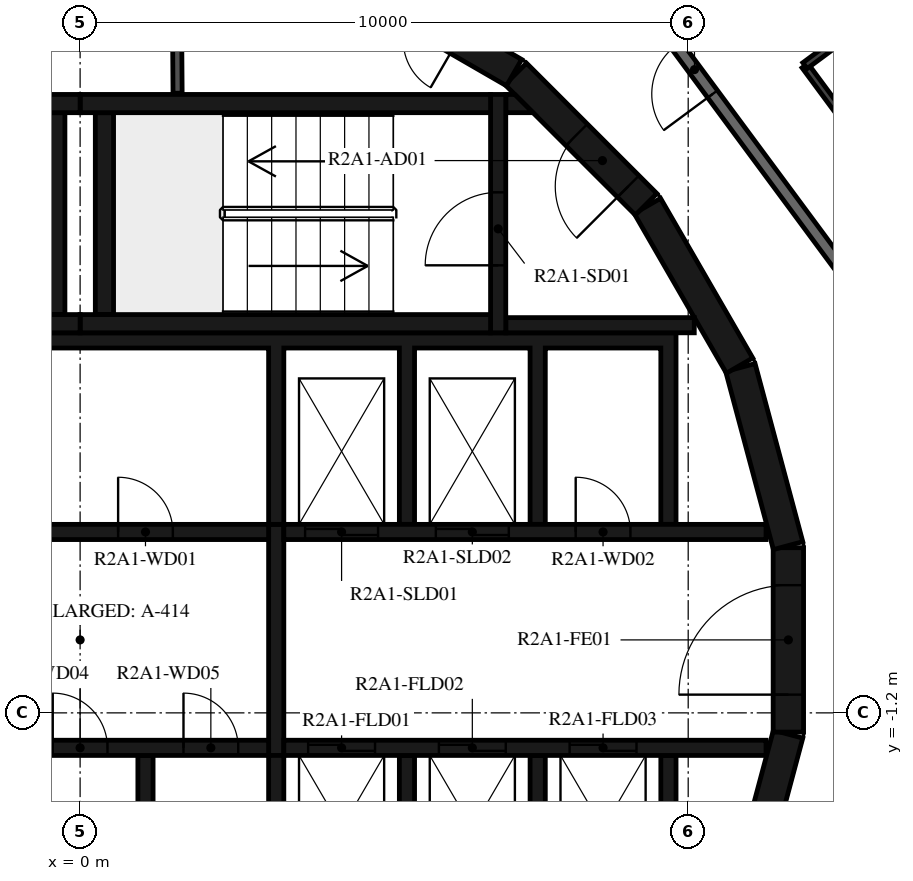
"""IFC4 building model, lengths in metres.
Left out: names, types, materials, properties, quantities, classifications, styles, units other than length and angle.
Written with IfcOpenShell. Run it as: python <this file> out.ifc"""

import sys

from ifc_helpers import new_model, si_unit, direction, frame, frame_2d, origin, place, context, subcontext, project, spatial, polyline, rectangle, outline, extrude, element, fill, save


model = new_model("IFC4")
c1 = context("Model", 3, precision=1e-05, world=origin(), true_north=direction((0.0, 1.0)))
c2 = subcontext(c1, "Body", "Model", "MODEL_VIEW")
j1 = project(units=[si_unit("LENGTHUNIT", "METRE"), si_unit("PLANEANGLEUNIT", "RADIAN")], contexts=[c1])
p1 = place(None, origin())
s1 = spatial("IfcSite", under=j1, at=p1, CompositionType="ELEMENT")
p2 = place(p1, origin())
s2 = spatial("IfcBuilding", under=s1, at=p2, CompositionType="ELEMENT")
p3 = place(p2, frame((0.0, 0.0, 80.2)))
s3 = spatial("IfcBuildingStorey", under=s2, at=p3, CompositionType="ELEMENT", Elevation=80.2)
p4 = place(p3, frame((10.858, -4.479, 0.0), z_axis=(0.0, 0.0, 1.0), x_axis=(0.258734743916, 0.965948410781, 0.0)))
e1 = element("IfcWall", 1, at=p4, inside=s3, PredefinedType="SHEAR", context=c2, shape_type="SweptSolid", body=[
    extrude(rectangle(XDim=3.033, YDim=0.5, at=frame_2d((1.516, 0.0))), origin(), (0.0, 0.0, 1.0), 3.12),
])
p5 = place(p3, frame((11.647, -1.516, 0.0), z_axis=(0.0, 0.0, 1.0), x_axis=(0.0, 1.0, 0.0)))
e2 = element("IfcWall", 2, at=p5, inside=s3, PredefinedType="SHEAR", context=c2, shape_type="SweptSolid", body=[
    extrude(rectangle(XDim=3.033, YDim=0.5, at=frame_2d((1.516, 0.0))), origin(), (0.0, 0.0, 1.0), 3.12),
])
p6 = place(p5, frame((0.616, 0.0, 0.0)))
e3 = element("IfcOpeningElement", 3, at=p6, cuts=e2, PredefinedType="OPENING", context=c2, shape_type="SweptSolid", body=[
    extrude(rectangle(XDim=1.8, YDim=2.1, at=frame_2d((0.9, 1.05))), frame((0.0, 0.26, 0.0), z_axis=(0.0, -1.0, 0.0), x_axis=(1.0, 0.0, 0.0)), (0.0, 0.0, 1.0), 0.52),
])
for number, where, z_axis, x_axis in (
    (4, (11.643, 1.55, 0.0), (0.0, 0.0, 1.0), (-0.259, 0.966, 0.0)),
    (5, (10.845, 4.51, 0.0), (0.0, 0.0, 1.0), (-0.5, 0.866, 0.0)),
):
    element("IfcWall", number, at=place(p3, frame(where, z_axis=z_axis, x_axis=x_axis)), inside=s3, PredefinedType="SHEAR", context=c2, shape_type="SweptSolid", body=[
        extrude(rectangle(XDim=3.033, YDim=0.5, at=frame_2d((1.516, 0.0))), origin(), (0.0, 0.0, 1.0), 3.12),
    ])
p7 = place(p3, frame((9.308, 7.164, 0.0), z_axis=(0.0, 0.0, 1.0), x_axis=(-0.707106781187, 0.707106781187, 0.0)))
e6 = element("IfcWall", 6, at=p7, inside=s3, PredefinedType="SHEAR", context=c2, shape_type="SweptSolid", body=[
    extrude(rectangle(XDim=3.032, YDim=0.5, at=frame_2d((1.516, 0.0))), origin(), (0.0, 0.0, 1.0), 3.12),
])
p8 = place(p7, frame((0.416, 0.0, 0.0)))
e7 = element("IfcOpeningElement", 7, at=p8, cuts=e6, PredefinedType="OPENING", context=c2, shape_type="SweptSolid", body=[
    extrude(rectangle(XDim=1.2, YDim=2.1, at=frame_2d((0.6, 1.05))), frame((0.0, 0.26, 0.0), z_axis=(0.0, -1.0, 0.0), x_axis=(1.0, 0.0, 0.0)), (0.0, 0.0, 1.0), 0.52),
])
p9 = place(p3, frame((7.137, 9.329, 0.0), z_axis=(0.0, 0.0, 1.0), x_axis=(-0.865975092491, 0.500087131594, 0.0)))
e8 = element("IfcWall", 8, at=p9, inside=s3, PredefinedType="SHEAR", context=c2, shape_type="SweptSolid", body=[
    extrude(rectangle(XDim=3.033, YDim=0.5, at=frame_2d((1.516, 0.0))), origin(), (0.0, 0.0, 1.0), 3.12),
])
p10 = place(p9, frame((1.066, 0.0, 0.0)))
e9 = element("IfcOpeningElement", 9, at=p10, cuts=e8, PredefinedType="OPENING", context=c2, shape_type="SweptSolid", body=[
    extrude(rectangle(XDim=0.9, YDim=2.1, at=frame_2d((0.45, 1.05))), frame((0.0, 0.26, 0.0), z_axis=(0.0, -1.0, 0.0), x_axis=(1.0, 0.0, 0.0)), (0.0, 0.0, 1.0), 0.52),
])
for number, where, z_axis, x_axis in (
    (10, (0.0, 5.2, 0.0), (0.0, 0.0, 1.0), (1.0, 0.0, 0.0)),
    (11, (0.0, 8.82, 0.0), (0.0, 0.0, 1.0), (1.0, 0.0, 0.0)),
):
    element("IfcWall", number, at=place(p3, frame(where, z_axis=z_axis, x_axis=x_axis)), inside=s3, PredefinedType="SHEAR", context=c2, shape_type="SweptSolid", body=[
        extrude(rectangle(XDim=6.75, YDim=0.3, at=frame_2d((3.375, 0.0))), origin(), (0.0, 0.0, 1.0), 3.12),
    ])
p11 = place(p3, frame((0.4, 5.35, 0.0), z_axis=(0.0, 0.0, 1.0), x_axis=(0.0, 1.0, 0.0)))
e12 = element("IfcWall", 12, at=p11, inside=s3, PredefinedType="SHEAR", context=c2, shape_type="SweptSolid", body=[
    extrude(rectangle(XDim=3.32, YDim=0.3, at=frame_2d((1.66, 0.0))), origin(), (0.0, 0.0, 1.0), 3.12),
])
p12 = place(p3, frame((6.875, 5.05, 0.0), z_axis=(0.0, 0.0, 1.0), x_axis=(0.0, 1.0, 0.0)))
e13 = element("IfcWall", 13, at=p12, inside=s3, PredefinedType="SHEAR", context=c2, shape_type="SweptSolid", body=[
    extrude(rectangle(XDim=3.92, YDim=0.25, at=frame_2d((1.96, 0.0))), origin(), (0.0, 0.0, 1.0), 3.12),
])
p13 = place(p12, frame((1.11, 0.0, 0.0)))
e14 = element("IfcOpeningElement", 14, at=p13, cuts=e13, PredefinedType="OPENING", context=c2, shape_type="SweptSolid", body=[
    extrude(rectangle(XDim=1.2, YDim=2.1, at=frame_2d((0.6, 1.05))), frame((0.0, 0.135, 0.0), z_axis=(0.0, -1.0, 0.0), x_axis=(1.0, 0.0, 0.0)), (0.0, 0.0, 1.0), 0.27),
])
p14 = place(p3, frame((7.0, 5.175, 0.0), z_axis=(0.0, 0.0, 1.0), x_axis=(1.0, 0.0, 0.0)))
e15 = element("IfcWall", 15, at=p14, inside=s3, PredefinedType="SHEAR", context=c2, shape_type="SweptSolid", body=[
    extrude(rectangle(XDim=3.1, YDim=0.25, at=frame_2d((1.55, 0.0))), origin(), (0.0, 0.0, 1.0), 3.12),
])
p15 = place(p3, origin())
e16 = element("IfcWall", 16, at=p15, inside=s3, PredefinedType="SHEAR", context=c2, shape_type="SweptSolid", body=[
    extrude(outline(polyline([(7.448, 8.67), (7.0, 8.67), (7.0, 8.97), (7.148, 8.97), (7.448, 8.67)])), origin(), (0.0, 0.0, 1.0), 3.12),
])
for number, where, z_axis, x_axis in (
    (17, (-6.75, 5.2, 0.0), (0.0, 0.0, 1.0), (1.0, 0.0, 0.0)),
    (18, (-6.75, 8.82, 0.0), (0.0, 0.0, 1.0), (1.0, 0.0, 0.0)),
):
    element("IfcWall", number, at=place(p3, frame(where, z_axis=z_axis, x_axis=x_axis)), inside=s3, PredefinedType="SHEAR", context=c2, shape_type="SweptSolid", body=[
        extrude(rectangle(XDim=6.75, YDim=0.3, at=frame_2d((3.375, 0.0))), origin(), (0.0, 0.0, 1.0), 3.12),
    ])
p16 = place(p3, frame((-0.4, 5.35, 0.0), z_axis=(0.0, 0.0, 1.0), x_axis=(0.0, 1.0, 0.0)))
e19 = element("IfcWall", 19, at=p16, inside=s3, PredefinedType="SHEAR", context=c2, shape_type="SweptSolid", body=[
    extrude(rectangle(XDim=3.32, YDim=0.3, at=frame_2d((1.66, 0.0))), origin(), (0.0, 0.0, 1.0), 3.12),
])
p17 = place(p3, origin())
e20 = element("IfcWall", 20, at=p17, inside=s3, PredefinedType="SHEAR", context=c2, shape_type="SweptSolid", body=[
    extrude(outline(polyline([(-9.55, 4.8), (-7.65, 4.8), (-7.65, 1.9), (-7.4, 1.9), (-7.4, 4.8), (-5.5, 4.8), (-5.5, 1.9), (-5.25, 1.9), (-5.25, 4.8), (-3.35, 4.8), (-3.35, 1.9), (-3.1, 1.9), (-3.1, 4.8), (-1.2, 4.8), (-1.2, 1.9), (-0.95, 1.9), (-0.95, 4.8), (3.1, 4.8), (3.1, 1.9), (3.35, 1.9), (3.35, 4.8), (5.25, 4.8), (5.25, 1.9), (5.5, 1.9), (5.5, 4.8), (7.4, 4.8), (7.4, 1.9), (7.65, 1.9), (7.65, 4.8), (9.55, 4.8), (9.55, 1.9), (9.8, 1.9), (9.8, 4.8), (9.8, 5.05), (-9.8, 5.05), (-9.8, 4.8), (-9.8, 1.9), (-9.55, 1.9), (-9.55, 4.8)])), origin(), (0.0, 0.0, 1.0), 3.12),
])
p18 = place(p3, origin())
e21 = element("IfcWall", 21, at=p18, inside=s3, PredefinedType="SHEAR", context=c2, shape_type="SweptSolid", body=[
    extrude(outline(polyline([(9.8, -5.05), (9.8, -4.8), (9.8, -1.9), (9.55, -1.9), (9.55, -4.8), (7.65, -4.8), (7.65, -1.9), (7.4, -1.9), (7.4, -4.8), (5.5, -4.8), (5.5, -1.9), (5.25, -1.9), (5.25, -4.8), (3.35, -4.8), (3.35, -1.9), (3.1, -1.9), (3.1, -4.8), (1.2, -4.8), (1.2, -1.9), (0.95, -1.9), (0.95, -4.8), (-0.95, -4.8), (-0.95, -1.9), (-1.2, -1.9), (-1.2, -4.8), (-5.25, -4.8), (-5.25, -1.9), (-5.5, -1.9), (-5.5, -4.8), (-7.4, -4.8), (-7.4, -1.9), (-7.65, -1.9), (-7.65, -4.8), (-9.55, -4.8), (-9.55, -1.9), (-9.8, -1.9), (-9.8, -4.8), (-9.8, -5.05), (9.8, -5.05)])), origin(), (0.0, 0.0, 1.0), 3.12),
])
p19 = place(p3, frame((-11.28, 1.775, 0.0), z_axis=(0.0, 0.0, 1.0), x_axis=(1.0, 0.0, 0.0)))
e22 = element("IfcWall", 22, at=p19, inside=s3, PredefinedType="SHEAR", context=c2, shape_type="SweptSolid", body=[
    extrude(rectangle(XDim=14.38, YDim=0.25, at=frame_2d((7.19, 0.0))), origin(), (0.0, 0.0, 1.0), 3.12),
])
p20 = place(p19, frame((2.13, 0.0, 0.0)))
e23 = element("IfcOpeningElement", 23, at=p20, cuts=e22, PredefinedType="OPENING", context=c2, shape_type="SweptSolid", body=[
    extrude(rectangle(XDim=1.1, YDim=2.1, at=frame_2d((0.55, 1.05))), frame((0.0, 0.135, 0.0), z_axis=(0.0, -1.0, 0.0), x_axis=(1.0, 0.0, 0.0)), (0.0, 0.0, 1.0), 0.27),
])
p21 = place(p19, frame((4.28, 0.0, 0.0)))
e24 = element("IfcOpeningElement", 24, at=p21, cuts=e22, PredefinedType="OPENING", context=c2, shape_type="SweptSolid", body=[
    extrude(rectangle(XDim=1.1, YDim=2.1, at=frame_2d((0.55, 1.05))), frame((0.0, 0.135, 0.0), z_axis=(0.0, -1.0, 0.0), x_axis=(1.0, 0.0, 0.0)), (0.0, 0.0, 1.0), 0.27),
])
p22 = place(p19, frame((6.43, 0.0, 0.0)))
e25 = element("IfcOpeningElement", 25, at=p22, cuts=e22, PredefinedType="OPENING", context=c2, shape_type="SweptSolid", body=[
    extrude(rectangle(XDim=1.1, YDim=2.1, at=frame_2d((0.55, 1.05))), frame((0.0, 0.135, 0.0), z_axis=(0.0, -1.0, 0.0), x_axis=(1.0, 0.0, 0.0)), (0.0, 0.0, 1.0), 0.27),
])
p23 = place(p19, frame((8.58, 0.0, 0.0)))
e26 = element("IfcOpeningElement", 26, at=p23, cuts=e22, PredefinedType="OPENING", context=c2, shape_type="SweptSolid", body=[
    extrude(rectangle(XDim=1.1, YDim=2.1, at=frame_2d((0.55, 1.05))), frame((0.0, 0.135, 0.0), z_axis=(0.0, -1.0, 0.0), x_axis=(1.0, 0.0, 0.0)), (0.0, 0.0, 1.0), 0.27),
])
p24 = place(p19, frame((11.905, 0.0, 0.0)))
e27 = element("IfcOpeningElement", 27, at=p24, cuts=e22, PredefinedType="OPENING", context=c2, shape_type="SweptSolid", body=[
    extrude(rectangle(XDim=0.9, YDim=2.1, at=frame_2d((0.45, 1.05))), frame((0.0, 0.135, 0.0), z_axis=(0.0, -1.0, 0.0), x_axis=(1.0, 0.0, 0.0)), (0.0, 0.0, 1.0), 0.27),
])
p25 = place(p3, frame((3.35, 1.775, 0.0), z_axis=(0.0, 0.0, 1.0), x_axis=(1.0, 0.0, 0.0)))
e28 = element("IfcWall", 28, at=p25, inside=s3, PredefinedType="SHEAR", context=c2, shape_type="SweptSolid", body=[
    extrude(rectangle(XDim=7.93, YDim=0.25, at=frame_2d((3.965, 0.0))), origin(), (0.0, 0.0, 1.0), 3.12),
])
p26 = place(p25, frame((0.35, 0.0, 0.0)))
e29 = element("IfcOpeningElement", 29, at=p26, cuts=e28, PredefinedType="OPENING", context=c2, shape_type="SweptSolid", body=[
    extrude(rectangle(XDim=1.2, YDim=2.4, at=frame_2d((0.6, 1.2))), frame((0.0, 0.135, 0.0), z_axis=(0.0, -1.0, 0.0), x_axis=(1.0, 0.0, 0.0)), (0.0, 0.0, 1.0), 0.27),
])
p27 = place(p25, frame((2.5, 0.0, 0.0)))
e30 = element("IfcOpeningElement", 30, at=p27, cuts=e28, PredefinedType="OPENING", context=c2, shape_type="SweptSolid", body=[
    extrude(rectangle(XDim=1.2, YDim=2.4, at=frame_2d((0.6, 1.2))), frame((0.0, 0.135, 0.0), z_axis=(0.0, -1.0, 0.0), x_axis=(1.0, 0.0, 0.0)), (0.0, 0.0, 1.0), 0.27),
])
p28 = place(p25, frame((4.8, 0.0, 0.0)))
e31 = element("IfcOpeningElement", 31, at=p28, cuts=e28, PredefinedType="OPENING", context=c2, shape_type="SweptSolid", body=[
    extrude(rectangle(XDim=0.9, YDim=2.1, at=frame_2d((0.45, 1.05))), frame((0.0, 0.135, 0.0), z_axis=(0.0, -1.0, 0.0), x_axis=(1.0, 0.0, 0.0)), (0.0, 0.0, 1.0), 0.27),
])
p29 = place(p3, frame((-11.28, -1.775, 0.0), z_axis=(0.0, 0.0, 1.0), x_axis=(1.0, 0.0, 0.0)))
e32 = element("IfcWall", 32, at=p29, inside=s3, PredefinedType="SHEAR", context=c2, shape_type="SweptSolid", body=[
    extrude(rectangle(XDim=14.38, YDim=0.25, at=frame_2d((7.19, 0.0))), origin(), (0.0, 0.0, 1.0), 3.12),
])
p30 = place(p29, frame((7.605, 0.0, 0.0)))
e33 = element("IfcOpeningElement", 33, at=p30, cuts=e32, PredefinedType="OPENING", context=c2, shape_type="SweptSolid", body=[
    extrude(rectangle(XDim=0.9, YDim=2.1, at=frame_2d((0.45, 1.05))), frame((0.0, 0.135, 0.0), z_axis=(0.0, -1.0, 0.0), x_axis=(1.0, 0.0, 0.0)), (0.0, 0.0, 1.0), 0.27),
])
p31 = place(p29, frame((10.83, 0.0, 0.0)))
e34 = element("IfcOpeningElement", 34, at=p31, cuts=e32, PredefinedType="OPENING", context=c2, shape_type="SweptSolid", body=[
    extrude(rectangle(XDim=0.9, YDim=2.1, at=frame_2d((0.45, 1.05))), frame((0.0, 0.135, 0.0), z_axis=(0.0, -1.0, 0.0), x_axis=(1.0, 0.0, 0.0)), (0.0, 0.0, 1.0), 0.27),
])
p32 = place(p29, frame((12.98, 0.0, 0.0)))
e35 = element("IfcOpeningElement", 35, at=p32, cuts=e32, PredefinedType="OPENING", context=c2, shape_type="SweptSolid", body=[
    extrude(rectangle(XDim=0.9, YDim=2.1, at=frame_2d((0.45, 1.05))), frame((0.0, 0.135, 0.0), z_axis=(0.0, -1.0, 0.0), x_axis=(1.0, 0.0, 0.0)), (0.0, 0.0, 1.0), 0.27),
])
p33 = place(p3, frame((3.35, -1.775, 0.0), z_axis=(0.0, 0.0, 1.0), x_axis=(1.0, 0.0, 0.0)))
e36 = element("IfcWall", 36, at=p33, inside=s3, PredefinedType="SHEAR", context=c2, shape_type="SweptSolid", body=[
    extrude(rectangle(XDim=7.93, YDim=0.25, at=frame_2d((3.965, 0.0))), origin(), (0.0, 0.0, 1.0), 3.12),
])
p34 = place(p33, frame((0.4, 0.0, 0.0)))
e37 = element("IfcOpeningElement", 37, at=p34, cuts=e36, PredefinedType="OPENING", context=c2, shape_type="SweptSolid", body=[
    extrude(rectangle(XDim=1.1, YDim=2.4, at=frame_2d((0.55, 1.2))), frame((0.0, 0.135, 0.0), z_axis=(0.0, -1.0, 0.0), x_axis=(1.0, 0.0, 0.0)), (0.0, 0.0, 1.0), 0.27),
])
p35 = place(p33, frame((2.55, 0.0, 0.0)))
e38 = element("IfcOpeningElement", 38, at=p35, cuts=e36, PredefinedType="OPENING", context=c2, shape_type="SweptSolid", body=[
    extrude(rectangle(XDim=1.1, YDim=2.4, at=frame_2d((0.55, 1.2))), frame((0.0, 0.135, 0.0), z_axis=(0.0, -1.0, 0.0), x_axis=(1.0, 0.0, 0.0)), (0.0, 0.0, 1.0), 0.27),
])
p36 = place(p33, frame((4.7, 0.0, 0.0)))
e39 = element("IfcOpeningElement", 39, at=p36, cuts=e36, PredefinedType="OPENING", context=c2, shape_type="SweptSolid", body=[
    extrude(rectangle(XDim=1.1, YDim=2.4, at=frame_2d((0.55, 1.2))), frame((0.0, 0.135, 0.0), z_axis=(0.0, -1.0, 0.0), x_axis=(1.0, 0.0, 0.0)), (0.0, 0.0, 1.0), 0.27),
])
p37 = place(p3, frame((3.225, -1.9, 0.0), z_axis=(0.0, 0.0, 1.0), x_axis=(0.0, 1.0, 0.0)))
e40 = element("IfcWall", 40, at=p37, inside=s3, PredefinedType="SHEAR", context=c2, shape_type="SweptSolid", body=[
    extrude(rectangle(XDim=3.8, YDim=0.25, at=frame_2d((1.9, 0.0))), origin(), (0.0, 0.0, 1.0), 3.12),
])
p38 = place(p3, frame((1.586, 11.354, 0.0), z_axis=(0.0, 0.0, 1.0), x_axis=(0.007227482881, -0.999973881405, 0.0)))
e41 = element("IfcWall", 41, at=p38, inside=s3, PredefinedType="PARTITIONING", context=c2, shape_type="SweptSolid", body=[
    extrude(rectangle(XDim=2.365, YDim=0.15, at=frame_2d((1.182, 0.0))), origin(), (0.0, 0.0, 1.0), 3.12),
])
p39 = place(p38, frame((0.732, 0.0, 0.0)))
e42 = element("IfcOpeningElement", 42, at=p39, cuts=e41, PredefinedType="OPENING", context=c2, shape_type="SweptSolid", body=[
    extrude(rectangle(XDim=0.9, YDim=2.1, at=frame_2d((0.45, 1.05))), frame((0.0, 0.085, 0.0), z_axis=(0.0, -1.0, 0.0), x_axis=(1.0, 0.0, 0.0)), (0.0, 0.0, 1.0), 0.17),
])
p40 = place(p3, frame((11.1, -8.829, 0.0), z_axis=(0.0, 0.0, 1.0), x_axis=(0.398741918631, 0.917063183388, 0.0)))
e43 = element("IfcWall", 43, at=p40, inside=s3, PredefinedType="STANDARD", context=c2, shape_type="SweptSolid", body=[
    extrude(rectangle(XDim=7.342, YDim=0.2, at=frame_2d((3.671, 0.0))), origin(), (0.0, 0.0, 1.0), 3.12),
])
p41 = place(p3, frame((13.196, 5.198, 0.0), z_axis=(0.0, 0.0, 1.0), x_axis=(-0.594805187394, 0.803869883159, 0.0)))
e44 = element("IfcWall", 44, at=p41, inside=s3, PredefinedType="STANDARD", context=c2, shape_type="SweptSolid", body=[
    extrude(rectangle(XDim=7.342, YDim=0.2, at=frame_2d((3.671, 0.0))), origin(), (0.0, 0.0, 1.0), 3.12),
])
p42 = place(p41, frame((4.7, 0.0, 0.0)))
e45 = element("IfcOpeningElement", 45, at=p42, cuts=e44, PredefinedType="OPENING", context=c2, shape_type="SweptSolid", body=[
    extrude(rectangle(XDim=1.0, YDim=2.1, at=frame_2d((0.5, 1.05))), frame((0.0, 0.11, 0.0), z_axis=(0.0, -1.0, 0.0), x_axis=(1.0, 0.0, 0.0)), (0.0, 0.0, 1.0), 0.22),
])
p43 = place(p3, frame((14.641, 5.767, 0.0), z_axis=(0.0, 0.0, 1.0), x_axis=(-0.594785744505, 0.803884269117, 0.0)))
e46 = element("IfcWall", 46, at=p43, inside=s3, PredefinedType="PARTITIONING", context=c2, shape_type="SweptSolid", body=[
    extrude(rectangle(XDim=4.573, YDim=0.12, at=frame_2d((2.287, 0.0))), origin(), (0.0, 0.0, 1.0), 3.12),
])
p44 = place(p43, frame((0.513, 0.0, 0.0)))
e47 = element("IfcOpeningElement", 47, at=p44, cuts=e46, PredefinedType="OPENING", context=c2, shape_type="SweptSolid", body=[
    extrude(rectangle(XDim=0.9, YDim=2.1, at=frame_2d((0.45, 1.05))), frame((0.0, 0.07, 0.0), z_axis=(0.0, -1.0, 0.0), x_axis=(1.0, 0.0, 0.0)), (0.0, 0.0, 1.0), 0.14),
])
p45 = place(p3, frame((11.921, 9.444, 0.0), z_axis=(0.0, 0.0, 1.0), x_axis=(0.803838630796, 0.594847422151, 0.0)))
e48 = element("IfcWall", 48, at=p45, inside=s3, PredefinedType="PARTITIONING", context=c2, shape_type="SweptSolid", body=[
    extrude(rectangle(XDim=2.857, YDim=0.12, at=frame_2d((1.429, 0.0))), origin(), (0.0, 0.0, 1.0), 3.12),
])
p46 = place(p13, origin())
e49 = element("IfcDoor", 49, at=p46, inside=s3, OperationType="SINGLE_SWING_LEFT", PredefinedType="DOOR", context=c2, shape_type="SweptSolid", body=[
    extrude(rectangle(XDim=1.2, YDim=2.1, at=frame_2d((0.6, 1.05))), frame((0.0, 0.025, 0.0), z_axis=(0.0, -1.0, 0.0), x_axis=(1.0, 0.0, 0.0)), (0.0, 0.0, 1.0), 0.05),
])
fill(e14, e49)
p47 = place(p8, origin())
e50 = element("IfcDoor", 50, at=p47, inside=s3, OperationType="SINGLE_SWING_RIGHT", PredefinedType="DOOR", context=c2, shape_type="SweptSolid", body=[
    extrude(rectangle(XDim=1.2, YDim=2.1, at=frame_2d((0.6, 1.05))), frame((0.0, 0.025, 0.0), z_axis=(0.0, -1.0, 0.0), x_axis=(1.0, 0.0, 0.0)), (0.0, 0.0, 1.0), 0.05),
])
fill(e7, e50)
p48 = place(p6, origin())
e51 = element("IfcDoor", 51, at=p48, inside=s3, OperationType="DOUBLE_DOOR_SINGLE_SWING", PredefinedType="DOOR", context=c2, shape_type="SweptSolid", body=[
    extrude(rectangle(XDim=1.8, YDim=2.1, at=frame_2d((0.9, 1.05))), frame((0.0, 0.025, 0.0), z_axis=(0.0, -1.0, 0.0), x_axis=(1.0, 0.0, 0.0)), (0.0, 0.0, 1.0), 0.05),
])
fill(e3, e51)
p49 = place(p26, origin())
e52 = element("IfcDoor", 52, at=p49, inside=s3, OperationType="DOUBLE_DOOR_SLIDING", PredefinedType="DOOR", context=c2, shape_type="SweptSolid", body=[
    extrude(rectangle(XDim=1.2, YDim=2.4, at=frame_2d((0.6, 1.2))), frame((0.0, 0.025, 0.0), z_axis=(0.0, -1.0, 0.0), x_axis=(1.0, 0.0, 0.0)), (0.0, 0.0, 1.0), 0.05),
])
fill(e29, e52)
p50 = place(p27, origin())
e53 = element("IfcDoor", 53, at=p50, inside=s3, OperationType="DOUBLE_DOOR_SLIDING", PredefinedType="DOOR", context=c2, shape_type="SweptSolid", body=[
    extrude(rectangle(XDim=1.2, YDim=2.4, at=frame_2d((0.6, 1.2))), frame((0.0, 0.025, 0.0), z_axis=(0.0, -1.0, 0.0), x_axis=(1.0, 0.0, 0.0)), (0.0, 0.0, 1.0), 0.05),
])
fill(e30, e53)
p51 = place(p34, origin())
e54 = element("IfcDoor", 54, at=p51, inside=s3, OperationType="DOUBLE_DOOR_SLIDING", PredefinedType="DOOR", context=c2, shape_type="SweptSolid", body=[
    extrude(rectangle(XDim=1.1, YDim=2.4, at=frame_2d((0.55, 1.2))), frame((0.0, 0.025, 0.0), z_axis=(0.0, -1.0, 0.0), x_axis=(1.0, 0.0, 0.0)), (0.0, 0.0, 1.0), 0.05),
])
fill(e37, e54)
p52 = place(p35, origin())
e55 = element("IfcDoor", 55, at=p52, inside=s3, OperationType="DOUBLE_DOOR_SLIDING", PredefinedType="DOOR", context=c2, shape_type="SweptSolid", body=[
    extrude(rectangle(XDim=1.1, YDim=2.4, at=frame_2d((0.55, 1.2))), frame((0.0, 0.025, 0.0), z_axis=(0.0, -1.0, 0.0), x_axis=(1.0, 0.0, 0.0)), (0.0, 0.0, 1.0), 0.05),
])
fill(e38, e55)
p53 = place(p36, origin())
e56 = element("IfcDoor", 56, at=p53, inside=s3, OperationType="DOUBLE_DOOR_SLIDING", PredefinedType="DOOR", context=c2, shape_type="SweptSolid", body=[
    extrude(rectangle(XDim=1.1, YDim=2.4, at=frame_2d((0.55, 1.2))), frame((0.0, 0.025, 0.0), z_axis=(0.0, -1.0, 0.0), x_axis=(1.0, 0.0, 0.0)), (0.0, 0.0, 1.0), 0.05),
])
fill(e39, e56)
p54 = place(p24, origin())
e57 = element("IfcDoor", 57, at=p54, inside=s3, OperationType="SINGLE_SWING_RIGHT", PredefinedType="DOOR", context=c2, shape_type="SweptSolid", body=[
    extrude(rectangle(XDim=0.9, YDim=2.1, at=frame_2d((0.45, 1.05))), frame((0.0, 0.025, 0.0), z_axis=(0.0, -1.0, 0.0), x_axis=(1.0, 0.0, 0.0)), (0.0, 0.0, 1.0), 0.05),
])
fill(e27, e57)
p55 = place(p28, origin())
e58 = element("IfcDoor", 58, at=p55, inside=s3, OperationType="SINGLE_SWING_LEFT", PredefinedType="DOOR", context=c2, shape_type="SweptSolid", body=[
    extrude(rectangle(XDim=0.9, YDim=2.1, at=frame_2d((0.45, 1.05))), frame((0.0, 0.025, 0.0), z_axis=(0.0, -1.0, 0.0), x_axis=(1.0, 0.0, 0.0)), (0.0, 0.0, 1.0), 0.05),
])
fill(e31, e58)
p56 = place(p31, origin())
e59 = element("IfcDoor", 59, at=p56, inside=s3, OperationType="SINGLE_SWING_LEFT", PredefinedType="DOOR", context=c2, shape_type="SweptSolid", body=[
    extrude(rectangle(XDim=0.9, YDim=2.1, at=frame_2d((0.45, 1.05))), frame((0.0, 0.025, 0.0), z_axis=(0.0, -1.0, 0.0), x_axis=(1.0, 0.0, 0.0)), (0.0, 0.0, 1.0), 0.05),
])
fill(e34, e59)
p57 = place(p32, origin())
e60 = element("IfcDoor", 60, at=p57, inside=s3, OperationType="SINGLE_SWING_RIGHT", PredefinedType="DOOR", context=c2, shape_type="SweptSolid", body=[
    extrude(rectangle(XDim=0.9, YDim=2.1, at=frame_2d((0.45, 1.05))), frame((0.0, 0.025, 0.0), z_axis=(0.0, -1.0, 0.0), x_axis=(1.0, 0.0, 0.0)), (0.0, 0.0, 1.0), 0.05),
])
fill(e35, e60)
p58 = place(p42, origin())
e61 = element("IfcDoor", 61, at=p58, inside=s3, OperationType="SINGLE_SWING_RIGHT", PredefinedType="DOOR", context=c2, shape_type="SweptSolid", body=[
    extrude(rectangle(XDim=1.0, YDim=2.1, at=frame_2d((0.5, 1.05))), frame((0.0, 0.025, 0.0), z_axis=(0.0, -1.0, 0.0), x_axis=(1.0, 0.0, 0.0)), (0.0, 0.0, 1.0), 0.05),
])
fill(e45, e61)
save(model, sys.argv[1])
